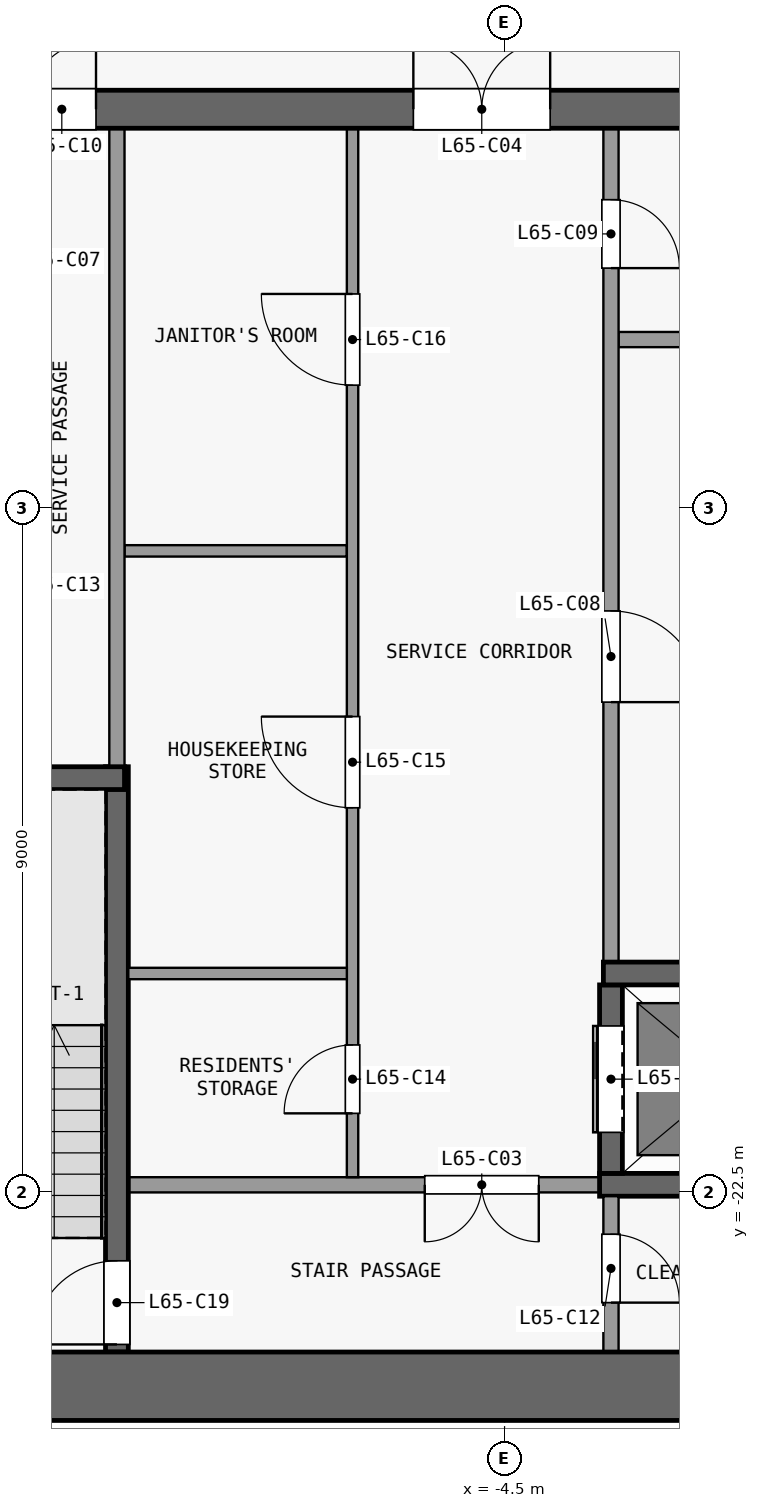
"""IFC4 building model, lengths in metres.
Left out: names, types, materials, properties, quantities, classifications, styles, units other than length and angle.
Written with IfcOpenShell. Run it as: python <this file> out.ifc"""

import sys

from ifc_helpers import new_model, si_unit, direction, frame, frame_2d, origin, place, context, subcontext, project, spatial, rectangle, extrude, element, fill, save


model = new_model("IFC4")
c1 = context("Model", 3, precision=1e-05, world=origin(), true_north=direction((0.0, 1.0)))
c2 = subcontext(c1, "Body", "Model", "MODEL_VIEW")
j1 = project(units=[si_unit("LENGTHUNIT", "METRE"), si_unit("PLANEANGLEUNIT", "RADIAN")], contexts=[c1])
p1 = place(None, origin())
s1 = spatial("IfcSite", under=j1, at=p1, CompositionType="ELEMENT")
p2 = place(p1, origin())
s2 = spatial("IfcBuilding", under=s1, at=p2, CompositionType="ELEMENT")
p3 = place(p2, frame((0.0, 0.0, 259.1)))
s3 = spatial("IfcBuildingStorey", under=s2, at=p3, CompositionType="ELEMENT", Elevation=259.1)
p4 = place(p3, frame((-13.1, -25.05, 0.0), z_axis=(0.0, 0.0, 1.0), x_axis=(1.0, 0.0, 0.0)))
e1 = element("IfcWall", 1, at=p4, inside=s3, PredefinedType="SHEAR", context=c2, shape_type="SweptSolid", body=[
    extrude(rectangle(XDim=26.2, YDim=0.9, at=frame_2d((13.1, 0.0))), origin(), (0.0, 0.0, 1.0), 3.3),
])
p5 = place(p3, frame((-13.1, -8.25, 0.0), z_axis=(0.0, 0.0, 1.0), x_axis=(1.0, 0.0, 0.0)))
e2 = element("IfcWall", 2, at=p5, inside=s3, PredefinedType="SHEAR", context=c2, shape_type="SweptSolid", body=[
    extrude(rectangle(XDim=26.2, YDim=0.5, at=frame_2d((13.1, 0.0))), origin(), (0.0, 0.0, 1.0), 3.3),
])
p6 = place(p5, frame((7.4, 0.0, 0.0)))
e3 = element("IfcOpeningElement", 3, at=p6, cuts=e2, PredefinedType="OPENING", context=c2, shape_type="SweptSolid", body=[
    extrude(rectangle(XDim=1.8, YDim=2.1, at=frame_2d((0.9, 1.05))), frame((0.0, 0.26, 0.0), z_axis=(0.0, -1.0, 0.0), x_axis=(1.0, 0.0, 0.0)), (0.0, 0.0, 1.0), 0.52),
])
p7 = place(p5, frame((17.0, 0.0, 0.0)))
e4 = element("IfcOpeningElement", 4, at=p7, cuts=e2, PredefinedType="OPENING", context=c2, shape_type="SweptSolid", body=[
    extrude(rectangle(XDim=1.8, YDim=2.1, at=frame_2d((0.9, 1.05))), frame((0.0, 0.26, 0.0), z_axis=(0.0, -1.0, 0.0), x_axis=(1.0, 0.0, 0.0)), (0.0, 0.0, 1.0), 0.52),
])
p8 = place(p5, frame((2.325, 0.0, 0.0)))
e5 = element("IfcOpeningElement", 5, at=p8, cuts=e2, PredefinedType="OPENING", context=c2, shape_type="SweptSolid", body=[
    extrude(rectangle(XDim=0.9, YDim=2.1, at=frame_2d((0.45, 1.05))), frame((0.0, 0.26, 0.0), z_axis=(0.0, -1.0, 0.0), x_axis=(1.0, 0.0, 0.0)), (0.0, 0.0, 1.0), 0.52),
])
p9 = place(p5, frame((23.675, 0.0, 0.0)))
e6 = element("IfcOpeningElement", 6, at=p9, cuts=e2, PredefinedType="OPENING", context=c2, shape_type="SweptSolid", body=[
    extrude(rectangle(XDim=1.2, YDim=2.1, at=frame_2d((0.6, 1.05))), frame((0.0, 0.26, 0.0), z_axis=(0.0, -1.0, 0.0), x_axis=(1.0, 0.0, 0.0)), (0.0, 0.0, 1.0), 0.52),
])
p10 = place(p3, frame((-3.25, -22.4, 0.0), z_axis=(0.0, 0.0, 1.0), x_axis=(-1.0, 0.0, 0.0)))
e7 = element("IfcWall", 7, at=p10, inside=s3, PredefinedType="PARTITIONING", context=c2, shape_type="SweptSolid", body=[
    extrude(rectangle(XDim=6.2, YDim=0.2, at=frame_2d((3.1, 0.0))), origin(), (0.0, 0.0, 1.0), 3.3),
])
p11 = place(p10, frame((0.8, 0.0, 0.0)))
e8 = element("IfcOpeningElement", 8, at=p11, cuts=e7, PredefinedType="OPENING", context=c2, shape_type="SweptSolid", body=[
    extrude(rectangle(XDim=1.5, YDim=2.1, at=frame_2d((0.75, 1.05))), frame((0.0, 0.11, 0.0), z_axis=(0.0, -1.0, 0.0), x_axis=(1.0, 0.0, 0.0)), (0.0, 0.0, 1.0), 0.22),
])
p12 = place(p3, frame((-3.25, -22.4, 0.0), z_axis=(0.0, 0.0, 1.0), x_axis=(1.0, 0.0, 0.0)))
e9 = element("IfcWall", 9, at=p12, inside=s3, PredefinedType="SHEAR", context=c2, shape_type="SweptSolid", body=[
    extrude(rectangle(XDim=6.5, YDim=0.3, at=frame_2d((3.25, 0.0))), origin(), (0.0, 0.0, 1.0), 3.3),
])
p13 = place(p3, frame((-9.45, -19.62, 0.0), z_axis=(0.0, 0.0, 1.0), x_axis=(1.0, 0.0, 0.0)))
e10 = element("IfcWall", 10, at=p13, inside=s3, PredefinedType="PARTITIONING", context=c2, shape_type="SweptSolid", body=[
    extrude(rectangle(XDim=2.875, YDim=0.15, at=frame_2d((1.438, 0.0))), origin(), (0.0, 0.0, 1.0), 3.3),
])
p14 = place(p3, frame((-3.2, -19.62, 0.0), z_axis=(0.0, 0.0, 1.0), x_axis=(1.0, 0.0, 0.0)))
e11 = element("IfcWall", 11, at=p14, inside=s3, PredefinedType="SHEAR", context=c2, shape_type="SweptSolid", body=[
    extrude(rectangle(XDim=3.05, YDim=0.3, at=frame_2d((1.525, 0.0))), origin(), (0.0, 0.0, 1.0), 3.3),
])
p15 = place(p3, frame((-12.6, -17.05, 0.0), z_axis=(0.0, 0.0, 1.0), x_axis=(1.0, 0.0, 0.0)))
e12 = element("IfcWall", 12, at=p15, inside=s3, PredefinedType="SHEAR", context=c2, shape_type="SweptSolid", body=[
    extrude(rectangle(XDim=3.1, YDim=0.3, at=frame_2d((1.55, 0.0))), origin(), (0.0, 0.0, 1.0), 3.3),
])
p16 = place(p3, frame((-9.5, -14.06, 0.0), z_axis=(0.0, 0.0, 1.0), x_axis=(1.0, 0.0, 0.0)))
e13 = element("IfcWall", 13, at=p16, inside=s3, PredefinedType="PARTITIONING", context=c2, shape_type="SweptSolid", body=[
    extrude(rectangle(XDim=2.925, YDim=0.15, at=frame_2d((1.462, 0.0))), origin(), (0.0, 0.0, 1.0), 3.3),
])
p17 = place(p3, frame((-3.0, -11.28, 0.0), z_axis=(0.0, 0.0, 1.0), x_axis=(1.0, 0.0, 0.0)))
e14 = element("IfcWall", 14, at=p17, inside=s3, PredefinedType="PARTITIONING", context=c2, shape_type="SweptSolid", body=[
    extrude(rectangle(XDim=2.9, YDim=0.2, at=frame_2d((1.45, 0.0))), origin(), (0.0, 0.0, 1.0), 3.3),
])
p18 = place(p3, frame((-9.6, -24.6, 0.0), z_axis=(0.0, 0.0, 1.0), x_axis=(0.0, 1.0, 0.0)))
e15 = element("IfcWall", 15, at=p18, inside=s3, PredefinedType="SHEAR", context=c2, shape_type="SweptSolid", body=[
    extrude(rectangle(XDim=7.7, YDim=0.3, at=frame_2d((3.85, 0.0))), origin(), (0.0, 0.0, 1.0), 3.3),
])
p19 = place(p18, frame((0.1, 0.0, 0.0)))
e16 = element("IfcOpeningElement", 16, at=p19, cuts=e15, PredefinedType="OPENING", context=c2, shape_type="SweptSolid", body=[
    extrude(rectangle(XDim=1.1, YDim=2.1, at=frame_2d((0.55, 1.05))), frame((0.0, 0.16, 0.0), z_axis=(0.0, -1.0, 0.0), x_axis=(1.0, 0.0, 0.0)), (0.0, 0.0, 1.0), 0.32),
])
p20 = place(p3, frame((-9.6, -16.9, 0.0), z_axis=(0.0, 0.0, 1.0), x_axis=(0.0, 1.0, 0.0)))
e17 = element("IfcWall", 17, at=p20, inside=s3, PredefinedType="PARTITIONING", context=c2, shape_type="SweptSolid", body=[
    extrude(rectangle(XDim=8.4, YDim=0.2, at=frame_2d((4.2, 0.0))), origin(), (0.0, 0.0, 1.0), 3.3),
])
p21 = place(p3, frame((-6.5, -22.3, 0.0), z_axis=(0.0, 0.0, 1.0), x_axis=(0.0, 1.0, 0.0)))
e18 = element("IfcWall", 18, at=p21, inside=s3, PredefinedType="PARTITIONING", context=c2, shape_type="SweptSolid", body=[
    extrude(rectangle(XDim=13.8, YDim=0.15, at=frame_2d((6.9, 0.0))), origin(), (0.0, 0.0, 1.0), 3.3),
])
p22 = place(p21, frame((0.84, 0.0, 0.0)))
e19 = element("IfcOpeningElement", 19, at=p22, cuts=e18, PredefinedType="OPENING", context=c2, shape_type="SweptSolid", body=[
    extrude(rectangle(XDim=0.9, YDim=2.1, at=frame_2d((0.45, 1.05))), frame((0.0, 0.085, 0.0), z_axis=(0.0, -1.0, 0.0), x_axis=(1.0, 0.0, 0.0)), (0.0, 0.0, 1.0), 0.17),
])
p23 = place(p21, frame((4.86, 0.0, 0.0)))
e20 = element("IfcOpeningElement", 20, at=p23, cuts=e18, PredefinedType="OPENING", context=c2, shape_type="SweptSolid", body=[
    extrude(rectangle(XDim=1.2, YDim=2.1, at=frame_2d((0.6, 1.05))), frame((0.0, 0.085, 0.0), z_axis=(0.0, -1.0, 0.0), x_axis=(1.0, 0.0, 0.0)), (0.0, 0.0, 1.0), 0.17),
])
p24 = place(p21, frame((10.42, 0.0, 0.0)))
e21 = element("IfcOpeningElement", 21, at=p24, cuts=e18, PredefinedType="OPENING", context=c2, shape_type="SweptSolid", body=[
    extrude(rectangle(XDim=1.2, YDim=2.1, at=frame_2d((0.6, 1.05))), frame((0.0, 0.085, 0.0), z_axis=(0.0, -1.0, 0.0), x_axis=(1.0, 0.0, 0.0)), (0.0, 0.0, 1.0), 0.17),
])
p25 = place(p3, frame((-3.1, -22.55, 0.0), z_axis=(0.0, 0.0, 1.0), x_axis=(0.0, -1.0, 0.0)))
e22 = element("IfcWall", 22, at=p25, inside=s3, PredefinedType="PARTITIONING", context=c2, shape_type="SweptSolid", body=[
    extrude(rectangle(XDim=2.05, YDim=0.2, at=frame_2d((1.025, 0.0))), origin(), (0.0, 0.0, 1.0), 3.3),
])
p26 = place(p25, frame((0.5, 0.0, 0.0)))
e23 = element("IfcOpeningElement", 23, at=p26, cuts=e22, PredefinedType="OPENING", context=c2, shape_type="SweptSolid", body=[
    extrude(rectangle(XDim=0.9, YDim=2.1, at=frame_2d((0.45, 1.05))), frame((0.0, 0.11, 0.0), z_axis=(0.0, -1.0, 0.0), x_axis=(1.0, 0.0, 0.0)), (0.0, 0.0, 1.0), 0.22),
])
p27 = place(p3, frame((-3.1, -22.25, 0.0), z_axis=(0.0, 0.0, 1.0), x_axis=(0.0, 1.0, 0.0)))
e24 = element("IfcWall", 24, at=p27, inside=s3, PredefinedType="SHEAR", context=c2, shape_type="SweptSolid", body=[
    extrude(rectangle(XDim=2.48, YDim=0.3, at=frame_2d((1.24, 0.0))), origin(), (0.0, 0.0, 1.0), 3.3),
])
p28 = place(p27, frame((0.54, 0.0, 0.0)))
e25 = element("IfcOpeningElement", 25, at=p28, cuts=e24, PredefinedType="OPENING", context=c2, shape_type="SweptSolid", body=[
    extrude(rectangle(XDim=1.4, YDim=2.1, at=frame_2d((0.7, 1.05))), frame((0.0, 0.16, 0.0), z_axis=(0.0, -1.0, 0.0), x_axis=(1.0, 0.0, 0.0)), (0.0, 0.0, 1.0), 0.32),
])
p29 = place(p3, frame((-3.1, -8.5, 0.0), z_axis=(0.0, 0.0, 1.0), x_axis=(0.0, -1.0, 0.0)))
e26 = element("IfcWall", 26, at=p29, inside=s3, PredefinedType="PARTITIONING", context=c2, shape_type="SweptSolid", body=[
    extrude(rectangle(XDim=10.97, YDim=0.2, at=frame_2d((5.485, 0.0))), origin(), (0.0, 0.0, 1.0), 3.3),
])
p30 = place(p29, frame((6.35, 0.0, 0.0)))
e27 = element("IfcOpeningElement", 27, at=p30, cuts=e26, PredefinedType="OPENING", context=c2, shape_type="SweptSolid", body=[
    extrude(rectangle(XDim=1.2, YDim=2.1, at=frame_2d((0.6, 1.05))), frame((0.0, 0.11, 0.0), z_axis=(0.0, -1.0, 0.0), x_axis=(1.0, 0.0, 0.0)), (0.0, 0.0, 1.0), 0.22),
])
p31 = place(p29, frame((0.94, 0.0, 0.0)))
e28 = element("IfcOpeningElement", 28, at=p31, cuts=e26, PredefinedType="OPENING", context=c2, shape_type="SweptSolid", body=[
    extrude(rectangle(XDim=0.9, YDim=2.1, at=frame_2d((0.45, 1.05))), frame((0.0, 0.11, 0.0), z_axis=(0.0, -1.0, 0.0), x_axis=(1.0, 0.0, 0.0)), (0.0, 0.0, 1.0), 0.22),
])
p32 = place(p28, origin())
e29 = element("IfcDoor", 29, at=p32, inside=s3, OperationType="DOUBLE_DOOR_SLIDING", PredefinedType="DOOR", context=c2, shape_type="SweptSolid", body=[
    extrude(rectangle(XDim=1.4, YDim=2.1, at=frame_2d((0.7, 1.05))), frame((0.0, 0.025, 0.0), z_axis=(0.0, -1.0, 0.0), x_axis=(1.0, 0.0, 0.0)), (0.0, 0.0, 1.0), 0.05),
])
fill(e25, e29)
p33 = place(p11, origin())
e30 = element("IfcDoor", 30, at=p33, inside=s3, OperationType="DOUBLE_DOOR_SINGLE_SWING", PredefinedType="DOOR", context=c2, shape_type="SweptSolid", body=[
    extrude(rectangle(XDim=1.5, YDim=2.1, at=frame_2d((0.75, 1.05))), frame((0.0, 0.025, 0.0), z_axis=(0.0, -1.0, 0.0), x_axis=(1.0, 0.0, 0.0)), (0.0, 0.0, 1.0), 0.05),
])
fill(e8, e30)
p34 = place(p6, origin())
e31 = element("IfcDoor", 31, at=p34, inside=s3, OperationType="DOUBLE_DOOR_SINGLE_SWING", PredefinedType="DOOR", context=c2, shape_type="SweptSolid", body=[
    extrude(rectangle(XDim=1.8, YDim=2.1, at=frame_2d((0.9, 1.05))), frame((0.0, 0.025, 0.0), z_axis=(0.0, -1.0, 0.0), x_axis=(1.0, 0.0, 0.0)), (0.0, 0.0, 1.0), 0.05),
])
fill(e3, e31)
p35 = place(p30, origin())
e32 = element("IfcDoor", 32, at=p35, inside=s3, OperationType="SINGLE_SWING_RIGHT", PredefinedType="DOOR", context=c2, shape_type="SweptSolid", body=[
    extrude(rectangle(XDim=1.2, YDim=2.1, at=frame_2d((0.6, 1.05))), frame((0.0, 0.025, 0.0), z_axis=(0.0, -1.0, 0.0), x_axis=(1.0, 0.0, 0.0)), (0.0, 0.0, 1.0), 0.05),
])
fill(e27, e32)
p36 = place(p31, origin())
e33 = element("IfcDoor", 33, at=p36, inside=s3, OperationType="SINGLE_SWING_RIGHT", PredefinedType="DOOR", context=c2, shape_type="SweptSolid", body=[
    extrude(rectangle(XDim=0.9, YDim=2.1, at=frame_2d((0.45, 1.05))), frame((0.0, 0.025, 0.0), z_axis=(0.0, -1.0, 0.0), x_axis=(1.0, 0.0, 0.0)), (0.0, 0.0, 1.0), 0.05),
])
fill(e28, e33)
p37 = place(p8, origin())
e34 = element("IfcDoor", 34, at=p37, inside=s3, OperationType="SINGLE_SWING_RIGHT", PredefinedType="DOOR", context=c2, shape_type="SweptSolid", body=[
    extrude(rectangle(XDim=0.9, YDim=2.1, at=frame_2d((0.45, 1.05))), frame((0.0, 0.025, 0.0), z_axis=(0.0, -1.0, 0.0), x_axis=(1.0, 0.0, 0.0)), (0.0, 0.0, 1.0), 0.05),
])
fill(e5, e34)
p38 = place(p26, origin())
e35 = element("IfcDoor", 35, at=p38, inside=s3, OperationType="SINGLE_SWING_RIGHT", PredefinedType="DOOR", context=c2, shape_type="SweptSolid", body=[
    extrude(rectangle(XDim=0.9, YDim=2.1, at=frame_2d((0.45, 1.05))), frame((0.0, 0.025, 0.0), z_axis=(0.0, -1.0, 0.0), x_axis=(1.0, 0.0, 0.0)), (0.0, 0.0, 1.0), 0.05),
])
fill(e23, e35)
p39 = place(p22, origin())
e36 = element("IfcDoor", 36, at=p39, inside=s3, OperationType="SINGLE_SWING_LEFT", PredefinedType="DOOR", context=c2, shape_type="SweptSolid", body=[
    extrude(rectangle(XDim=0.9, YDim=2.1, at=frame_2d((0.45, 1.05))), frame((0.0, 0.025, 0.0), z_axis=(0.0, -1.0, 0.0), x_axis=(1.0, 0.0, 0.0)), (0.0, 0.0, 1.0), 0.05),
])
fill(e19, e36)
p40 = place(p23, origin())
e37 = element("IfcDoor", 37, at=p40, inside=s3, OperationType="SINGLE_SWING_RIGHT", PredefinedType="DOOR", context=c2, shape_type="SweptSolid", body=[
    extrude(rectangle(XDim=1.2, YDim=2.1, at=frame_2d((0.6, 1.05))), frame((0.0, 0.025, 0.0), z_axis=(0.0, -1.0, 0.0), x_axis=(1.0, 0.0, 0.0)), (0.0, 0.0, 1.0), 0.05),
])
fill(e20, e37)
p41 = place(p24, origin())
e38 = element("IfcDoor", 38, at=p41, inside=s3, OperationType="SINGLE_SWING_RIGHT", PredefinedType="DOOR", context=c2, shape_type="SweptSolid", body=[
    extrude(rectangle(XDim=1.2, YDim=2.1, at=frame_2d((0.6, 1.05))), frame((0.0, 0.025, 0.0), z_axis=(0.0, -1.0, 0.0), x_axis=(1.0, 0.0, 0.0)), (0.0, 0.0, 1.0), 0.05),
])
fill(e21, e38)
p42 = place(p19, origin())
e39 = element("IfcDoor", 39, at=p42, inside=s3, OperationType="SINGLE_SWING_LEFT", PredefinedType="DOOR", context=c2, shape_type="SweptSolid", body=[
    extrude(rectangle(XDim=1.1, YDim=2.1, at=frame_2d((0.55, 1.05))), frame((0.0, 0.025, 0.0), z_axis=(0.0, -1.0, 0.0), x_axis=(1.0, 0.0, 0.0)), (0.0, 0.0, 1.0), 0.05),
])
fill(e16, e39)
save(model, sys.argv[1])
